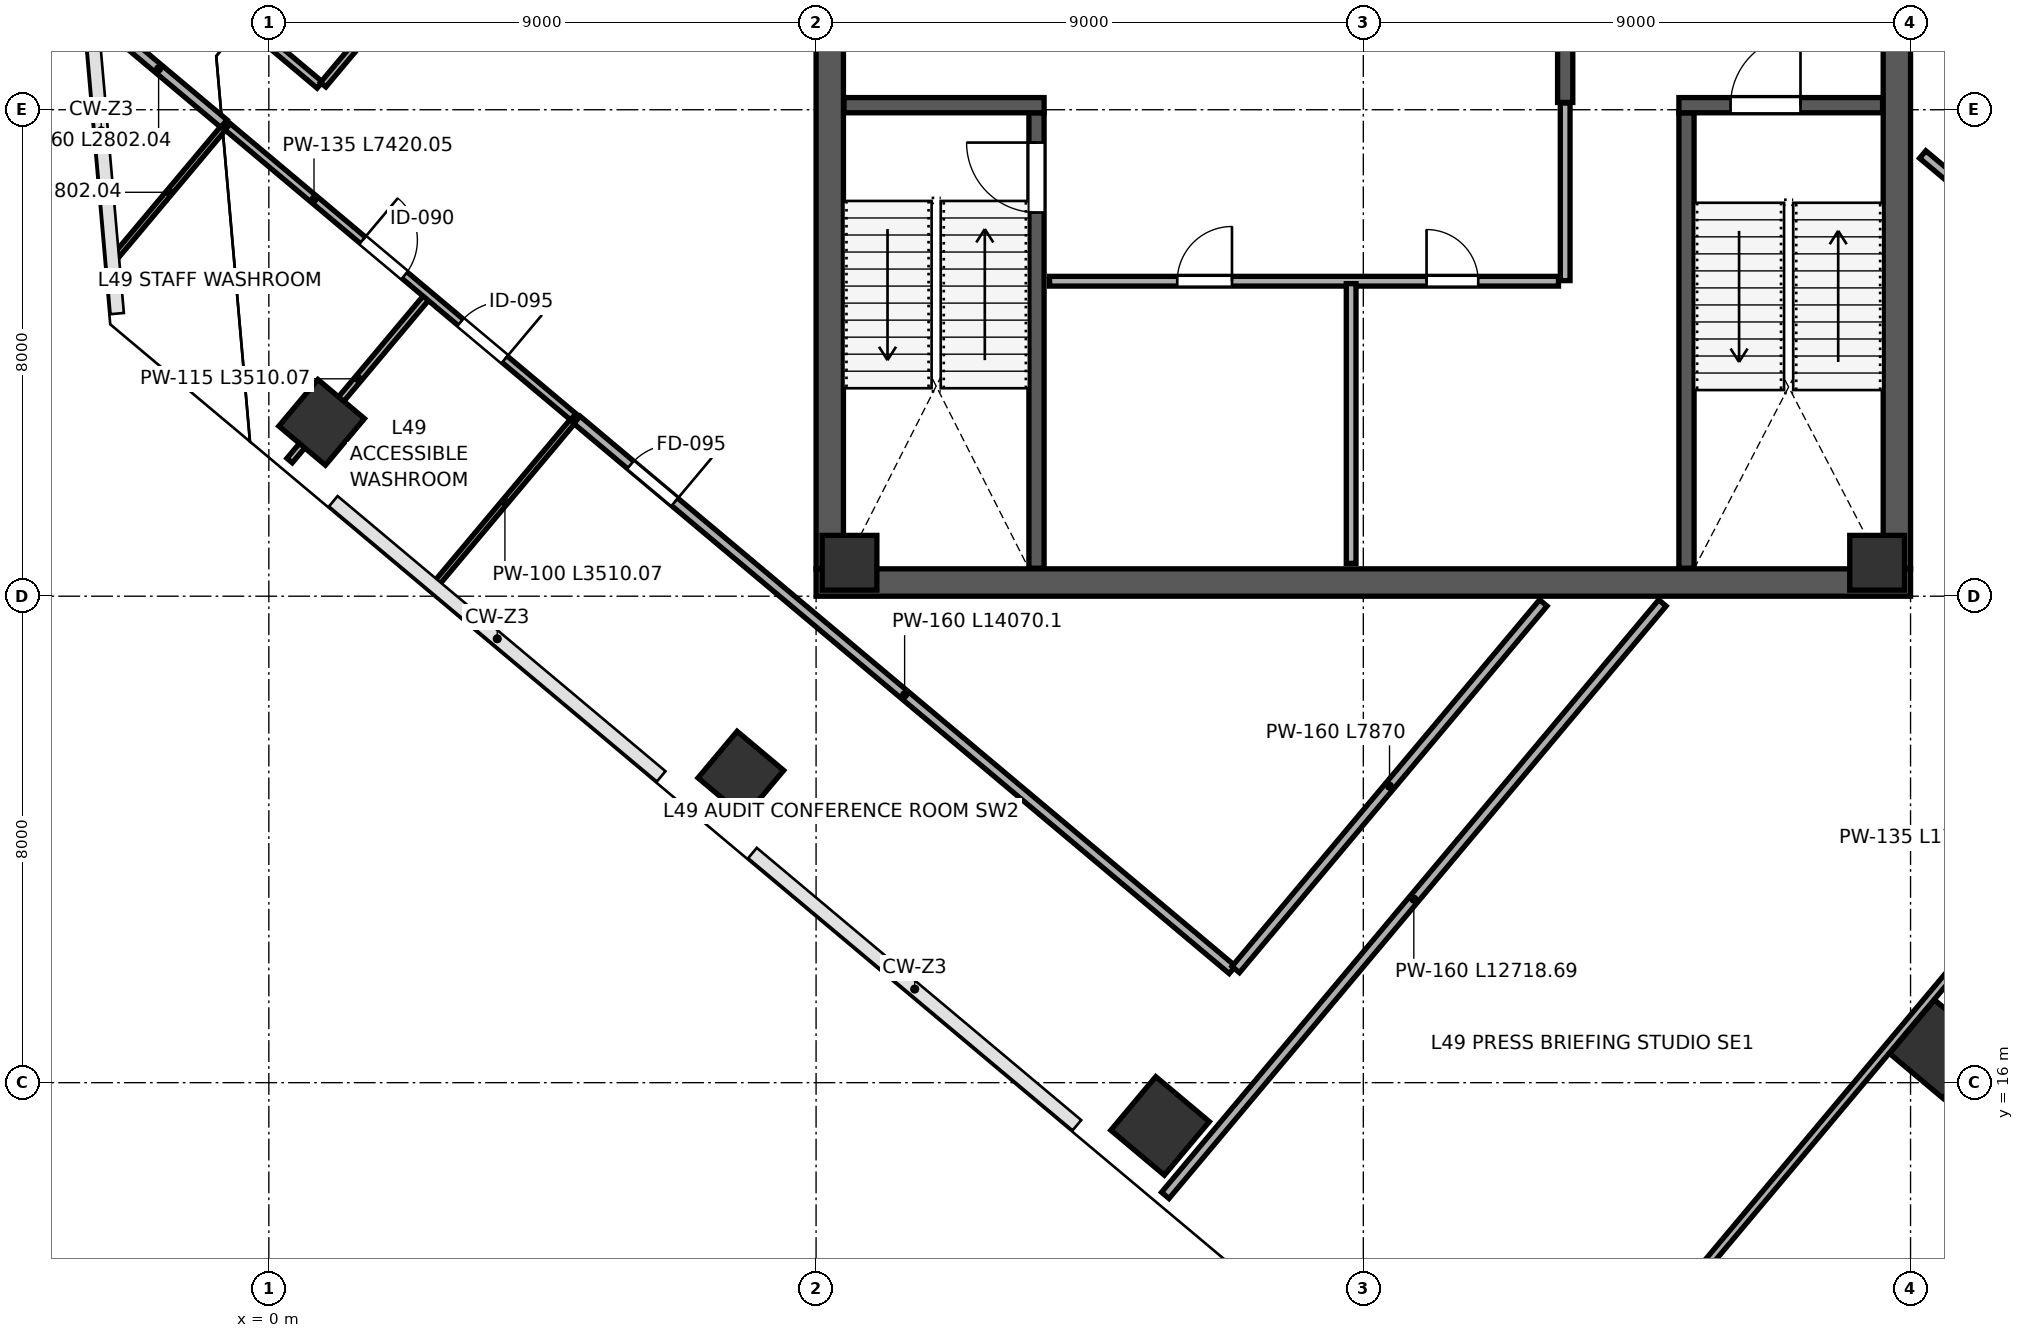
"""IFC4 building model, lengths in metres.
Left out: names, types, materials, properties, quantities, classifications, styles, units other than length and angle.
Written with IfcOpenShell. Run it as: python <this file> out.ifc"""

import sys

from ifc_helpers import new_model, si_unit, direction, frame, frame_2d, origin, origin_2d, place, context, subcontext, project, spatial, rectangle, extrude, source, transform, mapped, element, fill, save


model = new_model("IFC4")
c1 = context("Model", 3, precision=1e-05, world=origin(), true_north=direction((0.0, 1.0)))
c2 = subcontext(c1, "Body", "Model", "MODEL_VIEW")
j1 = project(units=[si_unit("LENGTHUNIT", "METRE"), si_unit("PLANEANGLEUNIT", "RADIAN")], contexts=[c1])
p1 = place(None, origin())
s1 = spatial("IfcSite", under=j1, at=p1, CompositionType="ELEMENT")
p2 = place(p1, origin())
s2 = spatial("IfcBuilding", under=s1, at=p2, CompositionType="ELEMENT")
p3 = place(p2, frame((0.0, 0.0, 220.6)))
s3 = spatial("IfcBuildingStorey", under=s2, at=p3, CompositionType="ELEMENT", Elevation=220.6)
m1 = source(origin(), c2, "Body", "SweptSolid", [
    extrude(rectangle(XDim=0.9, YDim=0.9, at=origin_2d()), origin(), (0.0, 0.0, 1.0), 4.198),
])
for number, where, z_axis, x_axis in (
    (1, (9.55, 24.55, 0.001), (0.0, 0.0, 1.0), (1.0, 0.0, 0.0)),
    (2, (26.45, 24.55, 0.001), (0.0, 0.0, 1.0), (1.0, 0.0, 0.0)),
):
    element("IfcColumn", number, at=place(p3, frame(where, z_axis=z_axis, x_axis=x_axis)), inside=s3, PredefinedType="COLUMN", context=c2, shape_type="MappedRepresentation", body=[
        mapped(m1, transform((0.0, 0.0, 0.0), scale=1.0)),
    ])
m2 = source(origin(), c2, "Body", "SweptSolid", [
    extrude(rectangle(XDim=1.0, YDim=1.0, at=origin_2d()), origin(), (0.0, 0.0, 1.0), 4.198),
])
for number, where, z_axis, x_axis in (
    (3, (0.868, 26.859, 0.001), (0.0, 0.0, 1.0), (-0.766, 0.643, 0.0)),
    (4, (7.763, 21.074, 0.001), (0.0, 0.0, 1.0), (-0.766, 0.643, 0.0)),
):
    element("IfcColumn", number, at=place(p3, frame(where, z_axis=z_axis, x_axis=x_axis)), inside=s3, PredefinedType="COLUMN", context=c2, shape_type="MappedRepresentation", body=[
        mapped(m2, transform((0.0, 0.0, 0.0), scale=1.0)),
    ])
m3 = source(origin(), c2, "Body", "SweptSolid", [
    extrude(rectangle(XDim=1.15, YDim=1.15, at=origin_2d()), origin(), (0.0, 0.0, 1.0), 4.198),
])
p4 = place(p3, frame((14.657, 15.289, 0.001), z_axis=(0.0, 0.0, 1.0), x_axis=(-0.766044443119, 0.642787609687, 0.0)))
e5 = element("IfcColumn", 5, at=p4, inside=s3, PredefinedType="COLUMN", context=c2, shape_type="MappedRepresentation", body=[
    mapped(m3, transform((0.0, 0.0, 0.0), scale=1.0)),
])
m4 = source(origin(), c2, "Body", "SweptSolid", [
    extrude(rectangle(XDim=1.15, YDim=1.15, at=origin_2d()), origin(), (0.0, 0.0, 1.0), 4.198),
])
p5 = place(p3, frame((27.465, 16.551, 0.001), z_axis=(0.0, 0.0, 1.0), x_axis=(-0.766044443119, 0.642787609687, 0.0)))
e6 = element("IfcColumn", 6, at=p5, inside=s3, PredefinedType="COLUMN", context=c2, shape_type="MappedRepresentation", body=[
    mapped(m4, transform((0.0, 0.0, 0.0), scale=1.0)),
])
p6 = place(p3, frame((9.225, 24.45, 0.0), z_axis=(0.0, 0.0, 1.0), x_axis=(0.0, 1.0, 0.0)))
e7 = element("IfcWall", 7, at=p6, inside=s3, PredefinedType="SHEAR", context=c2, shape_type="SweptSolid", body=[
    extrude(rectangle(XDim=15.1, YDim=0.45, at=frame_2d((7.55, 0.0))), origin(), (0.0, 0.0, 1.0), 3.96),
])
p7 = place(p6, frame((8.7, 0.0, 0.0)))
e8 = element("IfcOpeningElement", 8, at=p7, cuts=e7, PredefinedType="OPENING", context=c2, shape_type="SweptSolid", body=[
    extrude(rectangle(XDim=1.15, YDim=2.2, at=frame_2d((0.575, 1.1))), frame((0.0, 0.235, 0.0), z_axis=(0.0, -1.0, 0.0), x_axis=(1.0, 0.0, 0.0)), (0.0, 0.0, 1.0), 0.47),
])
p8 = place(p3, frame((26.775, 24.45, 0.0), z_axis=(0.0, 0.0, 1.0), x_axis=(0.0, 1.0, 0.0)))
e9 = element("IfcWall", 9, at=p8, inside=s3, PredefinedType="SHEAR", context=c2, shape_type="SweptSolid", body=[
    extrude(rectangle(XDim=15.1, YDim=0.45, at=frame_2d((7.55, 0.0))), origin(), (0.0, 0.0, 1.0), 3.96),
])
p9 = place(p8, frame((8.6, 0.0, 0.0)))
e10 = element("IfcOpeningElement", 10, at=p9, cuts=e9, PredefinedType="OPENING", context=c2, shape_type="SweptSolid", body=[
    extrude(rectangle(XDim=1.15, YDim=2.2, at=frame_2d((0.575, 1.1))), frame((0.0, 0.235, 0.0), z_axis=(0.0, -1.0, 0.0), x_axis=(1.0, 0.0, 0.0)), (0.0, 0.0, 1.0), 0.47),
])
p10 = place(p3, frame((9.0, 24.225, 0.0), z_axis=(0.0, 0.0, 1.0), x_axis=(1.0, 0.0, 0.0)))
e11 = element("IfcWall", 11, at=p10, inside=s3, PredefinedType="SHEAR", context=c2, shape_type="SweptSolid", body=[
    extrude(rectangle(XDim=18.0, YDim=0.45, at=frame_2d((9.0, 0.0))), origin(), (0.0, 0.0, 1.0), 3.96),
])
p11 = place(p3, frame((12.625, 24.46, 0.0), z_axis=(0.0, 0.0, 1.0), x_axis=(0.0, 1.0, 0.0)))
e12 = element("IfcWall", 12, at=p11, inside=s3, PredefinedType="SHEAR", context=c2, shape_type="SweptSolid", body=[
    extrude(rectangle(XDim=7.49, YDim=0.25, at=frame_2d((3.745, 0.0))), origin(), (0.0, 0.0, 1.0), 3.96),
])
p12 = place(p11, frame((5.85, 0.0, 0.0)))
e13 = element("IfcOpeningElement", 13, at=p12, cuts=e12, PredefinedType="OPENING", context=c2, shape_type="SweptSolid", body=[
    extrude(rectangle(XDim=1.15, YDim=2.2, at=frame_2d((0.575, 1.1))), frame((0.0, 0.135, 0.0), z_axis=(0.0, -1.0, 0.0), x_axis=(1.0, 0.0, 0.0)), (0.0, 0.0, 1.0), 0.27),
])
p13 = place(p3, frame((9.46, 32.075, 0.0), z_axis=(0.0, 0.0, 1.0), x_axis=(1.0, 0.0, 0.0)))
e14 = element("IfcWall", 14, at=p13, inside=s3, PredefinedType="SHEAR", context=c2, shape_type="SweptSolid", body=[
    extrude(rectangle(XDim=3.29, YDim=0.25, at=frame_2d((1.645, 0.0))), origin(), (0.0, 0.0, 1.0), 3.96),
])
p14 = place(p3, frame((23.315, 24.46, 0.0), z_axis=(0.0, 0.0, 1.0), x_axis=(0.0, 1.0, 0.0)))
e15 = element("IfcWall", 15, at=p14, inside=s3, PredefinedType="SHEAR", context=c2, shape_type="SweptSolid", body=[
    extrude(rectangle(XDim=7.49, YDim=0.25, at=frame_2d((3.745, 0.0))), origin(), (0.0, 0.0, 1.0), 3.96),
])
p15 = place(p3, frame((23.19, 32.075, 0.0), z_axis=(0.0, 0.0, 1.0), x_axis=(1.0, 0.0, 0.0)))
e16 = element("IfcWall", 16, at=p15, inside=s3, PredefinedType="SHEAR", context=c2, shape_type="SweptSolid", body=[
    extrude(rectangle(XDim=3.35, YDim=0.25, at=frame_2d((1.675, 0.0))), origin(), (0.0, 0.0, 1.0), 3.96),
])
p16 = place(p15, frame((0.85, 0.0, 0.0)))
e17 = element("IfcOpeningElement", 17, at=p16, cuts=e16, PredefinedType="OPENING", context=c2, shape_type="SweptSolid", body=[
    extrude(rectangle(XDim=1.15, YDim=2.2, at=frame_2d((0.575, 1.1))), frame((0.0, 0.135, 0.0), z_axis=(0.0, -1.0, 0.0), x_axis=(1.0, 0.0, 0.0)), (0.0, 0.0, 1.0), 0.27),
])
p17 = place(p3, frame((21.32, 32.12, 0.0), z_axis=(0.0, 0.0, 1.0), x_axis=(0.0, 1.0, 0.0)))
e18 = element("IfcWall", 18, at=p17, inside=s3, PredefinedType="SHEAR", context=c2, shape_type="SweptSolid", body=[
    extrude(rectangle(XDim=7.42, YDim=0.25, at=frame_2d((3.71, 0.0))), origin(), (0.0, 0.0, 1.0), 3.96),
])
p18 = place(p17, frame((1.4, 0.0, 0.0)))
e19 = element("IfcOpeningElement", 19, at=p18, cuts=e18, PredefinedType="OPENING", context=c2, shape_type="SweptSolid", body=[
    extrude(rectangle(XDim=1.15, YDim=2.2, at=frame_2d((0.575, 1.1))), frame((0.0, 0.135, 0.0), z_axis=(0.0, -1.0, 0.0), x_axis=(1.0, 0.0, 0.0)), (0.0, 0.0, 1.0), 0.27),
])
p19 = place(p3, frame((12.84, 29.18, 0.0), z_axis=(0.0, 0.0, 1.0), x_axis=(1.0, 0.0, 0.0)))
e20 = element("IfcWall", 20, at=p19, inside=s3, PredefinedType="PARTITIONING", context=c2, shape_type="SweptSolid", body=[
    extrude(rectangle(XDim=8.37, YDim=0.16, at=frame_2d((4.185, 0.0))), origin(), (0.0, 0.0, 1.0), 3.96),
])
p20 = place(p19, frame((2.1, 0.0, 0.0)))
e21 = element("IfcOpeningElement", 21, at=p20, cuts=e20, PredefinedType="OPENING", context=c2, shape_type="SweptSolid", body=[
    extrude(rectangle(XDim=0.9, YDim=2.15, at=frame_2d((0.45, 1.075))), frame((0.0, 0.09, 0.0), z_axis=(0.0, -1.0, 0.0), x_axis=(1.0, 0.0, 0.0)), (0.0, 0.0, 1.0), 0.18),
])
p21 = place(p19, frame((6.2, 0.0, 0.0)))
e22 = element("IfcOpeningElement", 22, at=p21, cuts=e20, PredefinedType="OPENING", context=c2, shape_type="SweptSolid", body=[
    extrude(rectangle(XDim=0.85, YDim=2.1, at=frame_2d((0.425, 1.05))), frame((0.0, 0.09, 0.0), z_axis=(0.0, -1.0, 0.0), x_axis=(1.0, 0.0, 0.0)), (0.0, 0.0, 1.0), 0.18),
])
p22 = place(p3, frame((17.8, 24.54, 0.0), z_axis=(0.0, 0.0, 1.0), x_axis=(0.0, 1.0, 0.0)))
e23 = element("IfcWall", 23, at=p22, inside=s3, PredefinedType="PARTITIONING", context=c2, shape_type="SweptSolid", body=[
    extrude(rectangle(XDim=4.6, YDim=0.16, at=frame_2d((2.3, 0.0))), origin(), (0.0, 0.0, 1.0), 3.96),
])
p23 = place(p3, frame((21.32, 29.19, 0.0), z_axis=(0.0, 0.0, 1.0), x_axis=(0.0, 1.0, 0.0)))
e24 = element("IfcWall", 24, at=p23, inside=s3, PredefinedType="PARTITIONING", context=c2, shape_type="SweptSolid", body=[
    extrude(rectangle(XDim=2.92, YDim=0.16, at=frame_2d((1.46, 0.0))), origin(), (0.0, 0.0, 1.0), 3.96),
])
p24 = place(p3, frame((-2.536, 29.569, 0.0), z_axis=(0.0, 0.0, 1.0), x_axis=(0.642777228426, 0.766053153911, 0.0)))
e25 = element("IfcWall", 25, at=p24, inside=s3, PredefinedType="PARTITIONING", context=c2, shape_type="SweptSolid", body=[
    extrude(rectangle(XDim=2.802, YDim=0.1, at=frame_2d((1.401, 0.0))), origin(), (0.0, 0.0, 1.0), 3.96),
])
p25 = place(p3, frame((-2.886, 33.573, 0.0), z_axis=(0.0, 0.0, 1.0), x_axis=(0.766060058075, -0.642769000048, 0.0)))
e26 = element("IfcWall", 26, at=p25, inside=s3, PredefinedType="PARTITIONING", context=c2, shape_type="SweptSolid", body=[
    extrude(rectangle(XDim=2.802, YDim=0.16, at=frame_2d((1.401, 0.0))), origin(), (0.0, 0.0, 1.0), 3.96),
])
p26 = place(p3, frame((0.341, 26.231, 0.0), z_axis=(0.0, 0.0, 1.0), x_axis=(0.642794003744, 0.766039077822, 0.0)))
e27 = element("IfcWall", 27, at=p26, inside=s3, PredefinedType="PARTITIONING", context=c2, shape_type="SweptSolid", body=[
    extrude(rectangle(XDim=3.51, YDim=0.115, at=frame_2d((1.755, 0.0))), origin(), (0.0, 0.0, 1.0), 3.195),
])
p27 = place(p3, frame((2.754, 24.206, 0.0), z_axis=(0.0, 0.0, 1.0), x_axis=(0.642753187144, 0.766073325744, 0.0)))
e28 = element("IfcWall", 28, at=p27, inside=s3, PredefinedType="PARTITIONING", context=c2, shape_type="SweptSolid", body=[
    extrude(rectangle(XDim=3.51, YDim=0.1, at=frame_2d((1.755, 0.0))), origin(), (0.0, 0.0, 1.0), 3.195),
])
p28 = place(p3, frame((-0.678, 31.721, 0.0), z_axis=(0.0, 0.0, 1.0), x_axis=(0.766043108328, -0.642789200425, 0.0)))
e29 = element("IfcWall", 29, at=p28, inside=s3, PredefinedType="PARTITIONING", context=c2, shape_type="SweptSolid", body=[
    extrude(rectangle(XDim=7.42, YDim=0.135, at=frame_2d((3.71, 0.0))), origin(), (0.0, 0.0, 1.0), 3.96),
])
p29 = place(p28, frame((2.9, 0.0, 0.0)))
e30 = element("IfcOpeningElement", 30, at=p29, cuts=e29, PredefinedType="OPENING", context=c2, shape_type="SweptSolid", body=[
    extrude(rectangle(XDim=0.9, YDim=2.15, at=frame_2d((0.45, 1.075))), frame((0.0, 0.078, 0.0), z_axis=(0.0, -1.0, 0.0), x_axis=(1.0, 0.0, 0.0)), (0.0, 0.0, 1.0), 0.155),
])
p30 = place(p28, frame((5.0, 0.0, 0.0)))
e31 = element("IfcOpeningElement", 31, at=p30, cuts=e29, PredefinedType="OPENING", context=c2, shape_type="SweptSolid", body=[
    extrude(rectangle(XDim=0.95, YDim=2.15, at=frame_2d((0.475, 1.075))), frame((0.0, 0.078, 0.0), z_axis=(0.0, -1.0, 0.0), x_axis=(1.0, 0.0, 0.0)), (0.0, 0.0, 1.0), 0.155),
])
p31 = place(p3, frame((5.067, 26.9, 0.0), z_axis=(0.0, 0.0, 1.0), x_axis=(0.766049317662, -0.642781800387, 0.0)))
e32 = element("IfcWall", 32, at=p31, inside=s3, PredefinedType="PARTITIONING", context=c2, shape_type="SweptSolid", body=[
    extrude(rectangle(XDim=14.07, YDim=0.16, at=frame_2d((7.035, 0.0))), origin(), (0.0, 0.0, 1.0), 3.96),
])
p32 = place(p31, frame((1.15, 0.0, 0.0)))
e33 = element("IfcOpeningElement", 33, at=p32, cuts=e32, PredefinedType="OPENING", context=c2, shape_type="SweptSolid", body=[
    extrude(rectangle(XDim=0.95, YDim=2.15, at=frame_2d((0.475, 1.075))), frame((0.0, 0.09, 0.0), z_axis=(0.0, -1.0, 0.0), x_axis=(1.0, 0.0, 0.0)), (0.0, 0.0, 1.0), 0.18),
])
p33 = place(p3, frame((15.902, 17.861, 0.0), z_axis=(0.0, 0.0, 1.0), x_axis=(0.642774387864, 0.766055537351, 0.0)))
e34 = element("IfcWall", 34, at=p33, inside=s3, PredefinedType="PARTITIONING", context=c2, shape_type="SweptSolid", body=[
    extrude(rectangle(XDim=7.87, YDim=0.16, at=frame_2d((3.935, 0.0))), origin(), (0.0, 0.0, 1.0), 3.96),
])
p34 = place(p3, frame((27.2, 31.264, 0.0), z_axis=(0.0, 0.0, 1.0), x_axis=(0.766046809659, -0.642784789344, 0.0)))
e35 = element("IfcWall", 35, at=p34, inside=s3, PredefinedType="PARTITIONING", context=c2, shape_type="SweptSolid", body=[
    extrude(rectangle(XDim=1.42, YDim=0.16, at=frame_2d((0.71, 0.0))), origin(), (0.0, 0.0, 1.0), 3.96),
])
p35 = place(p3, frame((-2.556, 35.254, 0.0), z_axis=(0.0, 0.0, 1.0), x_axis=(0.76603046424, -0.642804268698, 0.0)))
e36 = element("IfcWall", 36, at=p35, inside=s3, PredefinedType="PARTITIONING", context=c2, shape_type="SweptSolid", body=[
    extrude(rectangle(XDim=4.43, YDim=0.135, at=frame_2d((2.215, 0.0))), origin(), (0.0, 0.0, 1.0), 3.96),
])
p36 = place(p3, frame((0.894, 32.412, 0.0), z_axis=(0.0, 0.0, 1.0), x_axis=(0.642782006196, 0.766049144971, 0.0)))
e37 = element("IfcWall", 37, at=p36, inside=s3, PredefinedType="PARTITIONING", context=c2, shape_type="SweptSolid", body=[
    extrude(rectangle(XDim=28.95, YDim=0.115, at=frame_2d((14.475, 0.0))), origin(), (0.0, 0.0, 1.0), 3.96),
])
p37 = place(p36, frame((2.2, 0.0, 0.0)))
e38 = element("IfcOpeningElement", 38, at=p37, cuts=e37, PredefinedType="OPENING", context=c2, shape_type="SweptSolid", body=[
    extrude(rectangle(XDim=0.95, YDim=2.15, at=frame_2d((0.475, 1.075))), frame((0.0, 0.067, 0.0), z_axis=(0.0, -1.0, 0.0), x_axis=(1.0, 0.0, 0.0)), (0.0, 0.0, 1.0), 0.135),
])
p38 = place(p3, frame((14.743, 14.146, 0.0), z_axis=(0.0, 0.0, 1.0), x_axis=(0.642789996784, 0.7660424401, 0.0)))
e39 = element("IfcWall", 39, at=p38, inside=s3, PredefinedType="PARTITIONING", context=c2, shape_type="SweptSolid", body=[
    extrude(rectangle(XDim=12.719, YDim=0.16, at=frame_2d((6.359, 0.0))), origin(), (0.0, 0.0, 1.0), 3.96),
])
p39 = place(p3, frame((22.969, 12.204, 0.0), z_axis=(0.0, 0.0, 1.0), x_axis=(0.642787758903, 0.766044317912, 0.0)))
e40 = element("IfcWall", 40, at=p39, inside=s3, PredefinedType="PARTITIONING", context=c2, shape_type="SweptSolid", body=[
    extrude(rectangle(XDim=17.28, YDim=0.135, at=frame_2d((8.64, 0.0))), origin(), (0.0, 0.0, 1.0), 3.96),
])
m5 = source(origin(), c2, "Body", "SweptSolid", [
    extrude(rectangle(XDim=1.15, YDim=2.2, at=frame_2d((0.575, 1.1))), frame((0.0, 0.025, 0.0), z_axis=(0.0, -1.0, 0.0), x_axis=(1.0, 0.0, 0.0)), (0.0, 0.0, 1.0), 0.05),
])
p40 = place(p12, origin())
e41 = element("IfcDoor", 41, at=p40, inside=s3, OperationType="SINGLE_SWING_RIGHT", PredefinedType="DOOR", context=c2, shape_type="MappedRepresentation", body=[
    mapped(m5, transform((0.0, 0.0, 0.0), scale=1.0)),
])
fill(e13, e41)
p41 = place(p16, origin())
e42 = element("IfcDoor", 42, at=p41, inside=s3, OperationType="SINGLE_SWING_RIGHT", PredefinedType="DOOR", context=c2, shape_type="MappedRepresentation", body=[
    mapped(m5, transform((0.0, 0.0, 0.0), scale=1.0)),
])
fill(e17, e42)
m6 = source(origin(), c2, "Body", "SweptSolid", [
    extrude(rectangle(XDim=0.9, YDim=2.15, at=frame_2d((0.45, 1.075))), frame((0.0, 0.025, 0.0), z_axis=(0.0, -1.0, 0.0), x_axis=(1.0, 0.0, 0.0)), (0.0, 0.0, 1.0), 0.05),
])
p42 = place(p20, origin())
e43 = element("IfcDoor", 43, at=p42, inside=s3, OperationType="SINGLE_SWING_RIGHT", PredefinedType="DOOR", context=c2, shape_type="MappedRepresentation", body=[
    mapped(m6, transform((0.0, 0.0, 0.0), scale=1.0)),
])
fill(e21, e43)
m7 = source(origin(), c2, "Body", "SweptSolid", [
    extrude(rectangle(XDim=0.85, YDim=2.1, at=frame_2d((0.425, 1.05))), frame((0.0, 0.025, 0.0), z_axis=(0.0, -1.0, 0.0), x_axis=(1.0, 0.0, 0.0)), (0.0, 0.0, 1.0), 0.05),
])
p43 = place(p21, origin())
e44 = element("IfcDoor", 44, at=p43, inside=s3, OperationType="SINGLE_SWING_LEFT", PredefinedType="DOOR", context=c2, shape_type="MappedRepresentation", body=[
    mapped(m7, transform((0.0, 0.0, 0.0), scale=1.0)),
])
fill(e22, e44)
m8 = source(origin(), c2, "Body", "SweptSolid", [
    extrude(rectangle(XDim=0.9, YDim=2.15, at=frame_2d((0.45, 1.075))), frame((0.0, 0.025, 0.0), z_axis=(0.0, -1.0, 0.0), x_axis=(1.0, 0.0, 0.0)), (0.0, 0.0, 1.0), 0.05),
])
p44 = place(p29, origin())
e45 = element("IfcDoor", 45, at=p44, inside=s3, OperationType="SINGLE_SWING_LEFT", PredefinedType="DOOR", context=c2, shape_type="MappedRepresentation", body=[
    mapped(m8, transform((0.0, 0.0, 0.0), scale=1.0)),
])
fill(e30, e45)
m9 = source(origin(), c2, "Body", "SweptSolid", [
    extrude(rectangle(XDim=0.95, YDim=2.15, at=frame_2d((0.475, 1.075))), frame((0.0, 0.025, 0.0), z_axis=(0.0, -1.0, 0.0), x_axis=(1.0, 0.0, 0.0)), (0.0, 0.0, 1.0), 0.05),
])
p45 = place(p30, origin())
e46 = element("IfcDoor", 46, at=p45, inside=s3, OperationType="SINGLE_SWING_RIGHT", PredefinedType="DOOR", context=c2, shape_type="MappedRepresentation", body=[
    mapped(m9, transform((0.0, 0.0, 0.0), scale=1.0)),
])
fill(e31, e46)
m10 = source(origin(), c2, "Body", "SweptSolid", [
    extrude(rectangle(XDim=0.95, YDim=2.15, at=frame_2d((0.475, 1.075))), frame((0.0, 0.025, 0.0), z_axis=(0.0, -1.0, 0.0), x_axis=(1.0, 0.0, 0.0)), (0.0, 0.0, 1.0), 0.05),
])
p46 = place(p32, origin())
e47 = element("IfcDoor", 47, at=p46, inside=s3, OperationType="SINGLE_SWING_RIGHT", PredefinedType="DOOR", context=c2, shape_type="MappedRepresentation", body=[
    mapped(m10, transform((0.0, 0.0, 0.0), scale=1.0)),
])
fill(e33, e47)
save(model, sys.argv[1])
